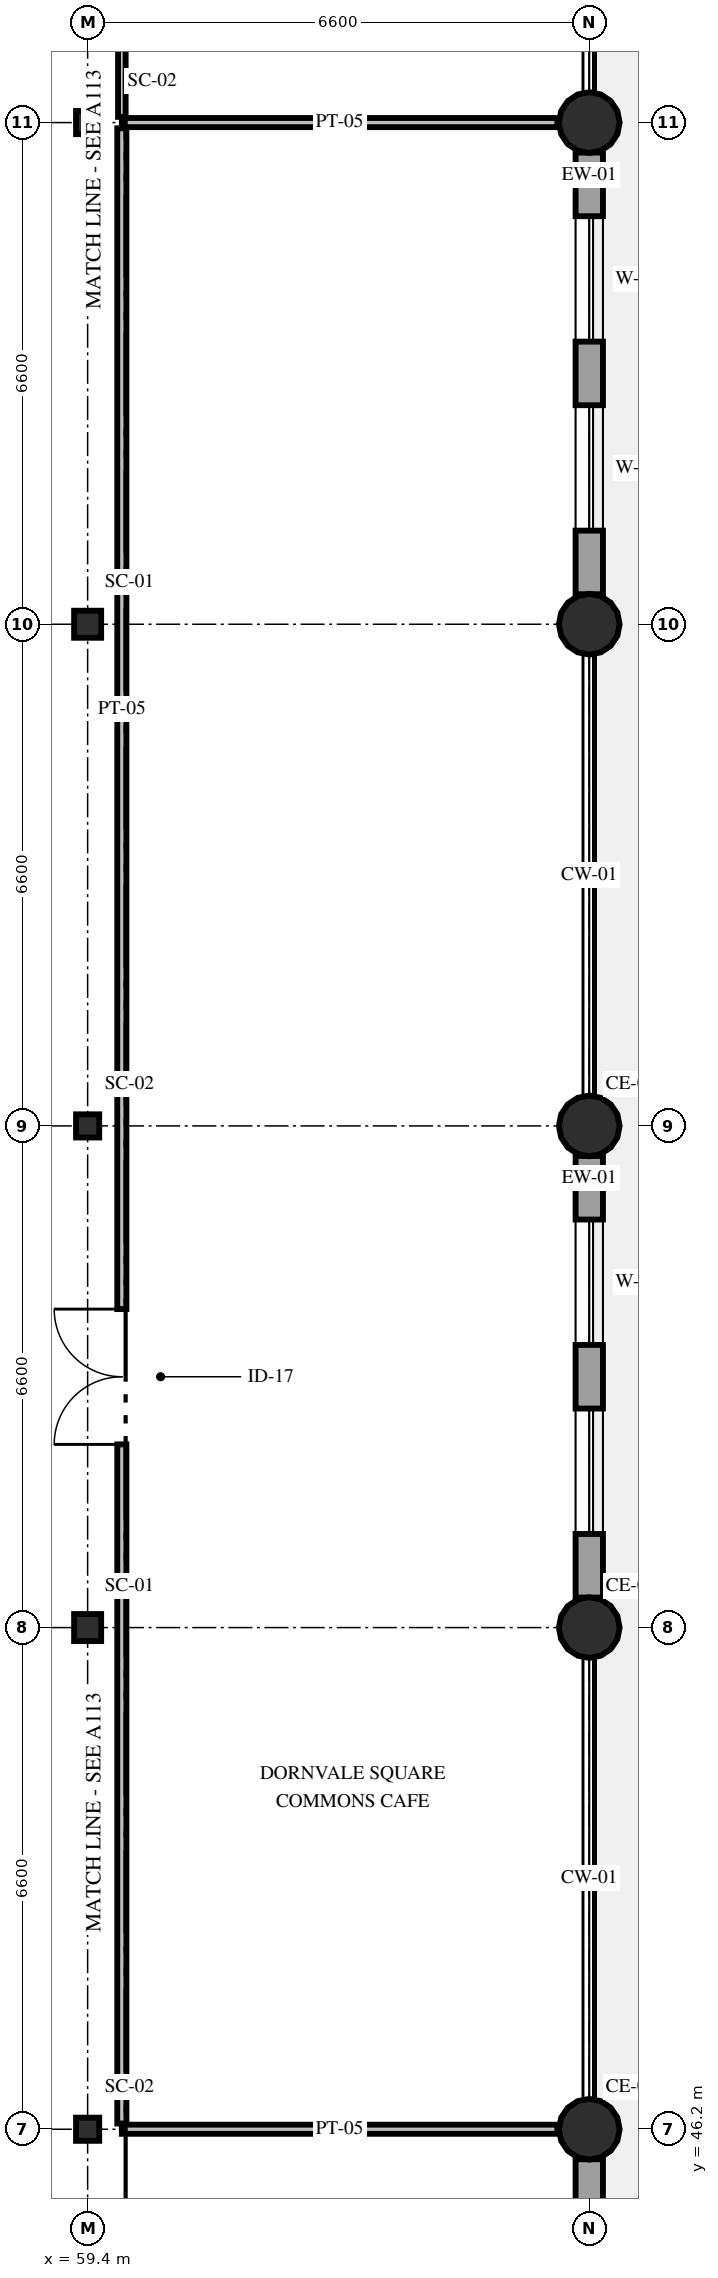
"""IFC4 building model, lengths in metres.
Left out: names, types, materials, properties, quantities, classifications, styles, units other than length and angle.
Written with IfcOpenShell. Run it as: python <this file> out.ifc"""

import sys

from ifc_helpers import new_model, si_unit, direction, frame, frame_2d, origin, origin_2d, place, context, subcontext, project, spatial, rectangle, hollow_rectangle, circle, i_section, extrude, element, fill, save


model = new_model("IFC4")
c1 = context("Model", 3, precision=1e-05, world=origin(), true_north=direction((0.0, 1.0)))
c2 = subcontext(c1, "Body", "Model", "MODEL_VIEW")
j1 = project(units=[si_unit("LENGTHUNIT", "METRE"), si_unit("PLANEANGLEUNIT", "RADIAN")], contexts=[c1])
p1 = place(None, origin())
s1 = spatial("IfcSite", under=j1, at=p1, CompositionType="ELEMENT")
p2 = place(p1, origin())
s2 = spatial("IfcBuilding", under=s1, at=p2, CompositionType="ELEMENT")
p3 = place(p2, origin())
s3 = spatial("IfcBuildingStorey", under=s2, at=p3, CompositionType="ELEMENT", Elevation=0.0)
p4 = place(p3, frame((59.4, 46.2, 0.0), z_axis=(0.0, 0.0, 1.0), x_axis=(1.0, 0.0, 0.0)))
e1 = element("IfcColumn", 1, at=p4, inside=s3, PredefinedType="COLUMN", context=c2, shape_type="SweptSolid", body=[
    extrude(hollow_rectangle(XDim=0.305, YDim=0.305, WallThickness=0.012, at=origin_2d()), origin(), (0.0, 0.0, 1.0), 5.4),
])
p5 = place(p3, frame((59.4, 52.8, 0.0), z_axis=(0.0, 0.0, 1.0), x_axis=(1.0, 0.0, 0.0)))
e2 = element("IfcColumn", 2, at=p5, inside=s3, PredefinedType="COLUMN", context=c2, shape_type="SweptSolid", body=[
    extrude(i_section(OverallWidth=0.356, OverallDepth=0.356, WebThickness=0.011, FlangeThickness=0.018, at=origin_2d()), origin(), (0.0, 0.0, 1.0), 5.4),
])
p6 = place(p3, frame((59.4, 59.4, 0.0), z_axis=(0.0, 0.0, 1.0), x_axis=(1.0, 0.0, 0.0)))
e3 = element("IfcColumn", 3, at=p6, inside=s3, PredefinedType="COLUMN", context=c2, shape_type="SweptSolid", body=[
    extrude(hollow_rectangle(XDim=0.305, YDim=0.305, WallThickness=0.012, at=origin_2d()), origin(), (0.0, 0.0, 1.0), 5.4),
])
p7 = place(p3, frame((59.4, 66.0, 0.0), z_axis=(0.0, 0.0, 1.0), x_axis=(1.0, 0.0, 0.0)))
e4 = element("IfcColumn", 4, at=p7, inside=s3, PredefinedType="COLUMN", context=c2, shape_type="SweptSolid", body=[
    extrude(i_section(OverallWidth=0.356, OverallDepth=0.356, WebThickness=0.011, FlangeThickness=0.018, at=origin_2d()), origin(), (0.0, 0.0, 1.0), 5.4),
])
p8 = place(p3, frame((59.4, 72.6, 0.0), z_axis=(0.0, 0.0, 1.0), x_axis=(1.0, 0.0, 0.0)))
e5 = element("IfcColumn", 5, at=p8, inside=s3, PredefinedType="COLUMN", context=c2, shape_type="SweptSolid", body=[
    extrude(hollow_rectangle(XDim=0.305, YDim=0.305, WallThickness=0.012, at=origin_2d()), origin(), (0.0, 0.0, 1.0), 5.4),
])
for number, where, z_axis, x_axis in (
    (6, (66.0, 46.2, 0.0), (0.0, 0.0, 1.0), (1.0, 0.0, 0.0)),
    (7, (66.0, 52.8, 0.0), (0.0, 0.0, 1.0), (1.0, 0.0, 0.0)),
    (8, (66.0, 59.4, 0.0), (0.0, 0.0, 1.0), (1.0, 0.0, 0.0)),
    (9, (66.0, 66.0, 0.0), (0.0, 0.0, 1.0), (1.0, 0.0, 0.0)),
    (10, (66.0, 72.6, 0.0), (0.0, 0.0, 1.0), (1.0, 0.0, 0.0)),
):
    element("IfcColumn", number, at=place(p3, frame(where, z_axis=z_axis, x_axis=x_axis)), inside=s3, PredefinedType="COLUMN", context=c2, shape_type="SweptSolid", body=[
        extrude(circle(Radius=0.4, at=origin_2d()), origin(), (0.0, 0.0, 1.0), 5.4),
    ])
p9 = place(p3, frame((66.0, 72.205, 0.0), z_axis=(0.0, 0.0, 1.0), x_axis=(0.0, -1.0, 0.0)))
e11 = element("IfcWall", 11, at=p9, inside=s3, PredefinedType="STANDARD", context=c2, shape_type="SweptSolid", body=[
    extrude(rectangle(XDim=5.81, YDim=0.36, at=frame_2d((2.905, 0.0))), origin(), (0.0, 0.0, 1.0), 4.55),
])
p10 = place(p9, frame((0.837, 0.0, 0.85)))
e12 = element("IfcOpeningElement", 12, at=p10, cuts=e11, PredefinedType="OPENING", context=c2, shape_type="SweptSolid", body=[
    extrude(rectangle(XDim=1.65, YDim=1.86, at=frame_2d((0.825, 0.93))), frame((0.0, 0.195, 0.0), z_axis=(0.0, -1.0, 0.0), x_axis=(1.0, 0.0, 0.0)), (0.0, 0.0, 1.0), 0.39),
])
p11 = place(p9, frame((3.323, 0.0, 0.85)))
e13 = element("IfcOpeningElement", 13, at=p11, cuts=e11, PredefinedType="OPENING", context=c2, shape_type="SweptSolid", body=[
    extrude(rectangle(XDim=1.65, YDim=1.86, at=frame_2d((0.825, 0.93))), frame((0.0, 0.195, 0.0), z_axis=(0.0, -1.0, 0.0), x_axis=(1.0, 0.0, 0.0)), (0.0, 0.0, 1.0), 0.39),
])
p12 = place(p3, frame((66.0, 59.005, 0.0), z_axis=(0.0, 0.0, 1.0), x_axis=(0.0, -1.0, 0.0)))
e14 = element("IfcWall", 14, at=p12, inside=s3, PredefinedType="STANDARD", context=c2, shape_type="SweptSolid", body=[
    extrude(rectangle(XDim=5.81, YDim=0.36, at=frame_2d((2.905, 0.0))), origin(), (0.0, 0.0, 1.0), 4.55),
])
p13 = place(p12, frame((0.837, 0.0, 0.85)))
e15 = element("IfcOpeningElement", 15, at=p13, cuts=e14, PredefinedType="OPENING", context=c2, shape_type="SweptSolid", body=[
    extrude(rectangle(XDim=1.65, YDim=1.86, at=frame_2d((0.825, 0.93))), frame((0.0, 0.195, 0.0), z_axis=(0.0, -1.0, 0.0), x_axis=(1.0, 0.0, 0.0)), (0.0, 0.0, 1.0), 0.39),
])
p14 = place(p12, frame((3.323, 0.0, 0.85)))
e16 = element("IfcOpeningElement", 16, at=p14, cuts=e14, PredefinedType="OPENING", context=c2, shape_type="SweptSolid", body=[
    extrude(rectangle(XDim=1.65, YDim=1.86, at=frame_2d((0.825, 0.93))), frame((0.0, 0.195, 0.0), z_axis=(0.0, -1.0, 0.0), x_axis=(1.0, 0.0, 0.0)), (0.0, 0.0, 1.0), 0.39),
])
p15 = place(p3, frame((66.0, 45.805, 0.0), z_axis=(0.0, 0.0, 1.0), x_axis=(0.0, -1.0, 0.0)))
e17 = element("IfcWall", 17, at=p15, inside=s3, PredefinedType="STANDARD", context=c2, shape_type="SweptSolid", body=[
    extrude(rectangle(XDim=5.81, YDim=0.36, at=frame_2d((2.905, 0.0))), origin(), (0.0, 0.0, 1.0), 4.55),
])
p16 = place(p15, frame((1.855, 0.0, 0.0)))
e18 = element("IfcOpeningElement", 18, at=p16, cuts=e17, PredefinedType="OPENING", context=c2, shape_type="SweptSolid", body=[
    extrude(rectangle(XDim=2.1, YDim=2.5, at=frame_2d((1.05, 1.25))), frame((0.0, 0.195, 0.0), z_axis=(0.0, -1.0, 0.0), x_axis=(1.0, 0.0, 0.0)), (0.0, 0.0, 1.0), 0.39),
])
for number, where, z_axis, x_axis in (
    (19, (59.85, 46.2, 0.0), (0.0, 0.0, 1.0), (1.0, 0.0, 0.0)),
    (20, (59.85, 72.6, 0.0), (0.0, 0.0, 1.0), (1.0, 0.0, 0.0)),
):
    element("IfcWall", number, at=place(p3, frame(where, z_axis=z_axis, x_axis=x_axis)), inside=s3, PredefinedType="PARTITIONING", context=c2, shape_type="SweptSolid", body=[
        extrude(rectangle(XDim=5.73, YDim=0.12, at=frame_2d((2.865, 0.0))), origin(), (0.0, 0.0, 1.0), 4.73),
    ])
p17 = place(p3, frame((59.85, 46.275, 0.0), z_axis=(0.0, 0.0, 1.0), x_axis=(0.0, 1.0, 0.0)))
e21 = element("IfcWall", 21, at=p17, inside=s3, PredefinedType="PARTITIONING", context=c2, shape_type="SweptSolid", body=[
    extrude(rectangle(XDim=26.25, YDim=0.12, at=frame_2d((13.125, 0.0))), origin(), (0.0, 0.0, 1.0), 4.73),
])
p18 = place(p17, frame((8.935, 0.0, 0.0)))
e22 = element("IfcOpeningElement", 22, at=p18, cuts=e21, PredefinedType="OPENING", context=c2, shape_type="SweptSolid", body=[
    extrude(rectangle(XDim=1.78, YDim=2.35, at=frame_2d((0.89, 1.175))), frame((0.0, 0.075, 0.0), z_axis=(0.0, -1.0, 0.0), x_axis=(1.0, 0.0, 0.0)), (0.0, 0.0, 1.0), 0.15),
])
p19 = place(p3, frame((59.85, 72.675, 0.0), z_axis=(0.0, 0.0, 1.0), x_axis=(0.0, 1.0, 0.0)))
e23 = element("IfcWall", 23, at=p19, inside=s3, PredefinedType="PARTITIONING", context=c2, shape_type="SweptSolid", body=[
    extrude(rectangle(XDim=6.46, YDim=0.1, at=frame_2d((3.23, 0.0))), origin(), (0.0, 0.0, 1.0), 4.73),
])
p20 = place(p19, frame((2.75, 0.0, 0.0)))
e24 = element("IfcOpeningElement", 24, at=p20, cuts=e23, PredefinedType="OPENING", context=c2, shape_type="SweptSolid", body=[
    extrude(rectangle(XDim=0.95, YDim=2.15, at=frame_2d((0.475, 1.075))), frame((0.0, 0.065, 0.0), z_axis=(0.0, -1.0, 0.0), x_axis=(1.0, 0.0, 0.0)), (0.0, 0.0, 1.0), 0.13),
])
p21 = place(p10, origin())
e25 = element("IfcWindow", 25, at=p21, inside=s3, PartitioningType="SINGLE_PANEL", PredefinedType="WINDOW", context=c2, shape_type="SweptSolid", body=[
    extrude(rectangle(XDim=1.65, YDim=1.86, at=frame_2d((0.825, 0.93))), frame((0.0, 0.03, 0.0), z_axis=(0.0, -1.0, 0.0), x_axis=(1.0, 0.0, 0.0)), (0.0, 0.0, 1.0), 0.06),
])
fill(e12, e25)
p22 = place(p11, origin())
e26 = element("IfcWindow", 26, at=p22, inside=s3, PartitioningType="SINGLE_PANEL", PredefinedType="WINDOW", context=c2, shape_type="SweptSolid", body=[
    extrude(rectangle(XDim=1.65, YDim=1.86, at=frame_2d((0.825, 0.93))), frame((0.0, 0.03, 0.0), z_axis=(0.0, -1.0, 0.0), x_axis=(1.0, 0.0, 0.0)), (0.0, 0.0, 1.0), 0.06),
])
fill(e13, e26)
p23 = place(p13, origin())
e27 = element("IfcWindow", 27, at=p23, inside=s3, PartitioningType="SINGLE_PANEL", PredefinedType="WINDOW", context=c2, shape_type="SweptSolid", body=[
    extrude(rectangle(XDim=1.65, YDim=1.86, at=frame_2d((0.825, 0.93))), frame((0.0, 0.03, 0.0), z_axis=(0.0, -1.0, 0.0), x_axis=(1.0, 0.0, 0.0)), (0.0, 0.0, 1.0), 0.06),
])
fill(e15, e27)
p24 = place(p14, origin())
e28 = element("IfcWindow", 28, at=p24, inside=s3, PartitioningType="SINGLE_PANEL", PredefinedType="WINDOW", context=c2, shape_type="SweptSolid", body=[
    extrude(rectangle(XDim=1.65, YDim=1.86, at=frame_2d((0.825, 0.93))), frame((0.0, 0.03, 0.0), z_axis=(0.0, -1.0, 0.0), x_axis=(1.0, 0.0, 0.0)), (0.0, 0.0, 1.0), 0.06),
])
fill(e16, e28)
p25 = place(p18, origin())
e29 = element("IfcDoor", 29, at=p25, inside=s3, OperationType="DOUBLE_DOOR_SINGLE_SWING", PredefinedType="DOOR", context=c2, shape_type="SweptSolid", body=[
    extrude(rectangle(XDim=1.78, YDim=2.35, at=frame_2d((0.89, 1.175))), frame((0.0, 0.025, 0.0), z_axis=(0.0, -1.0, 0.0), x_axis=(1.0, 0.0, 0.0)), (0.0, 0.0, 1.0), 0.05),
])
fill(e22, e29)
save(model, sys.argv[1])
